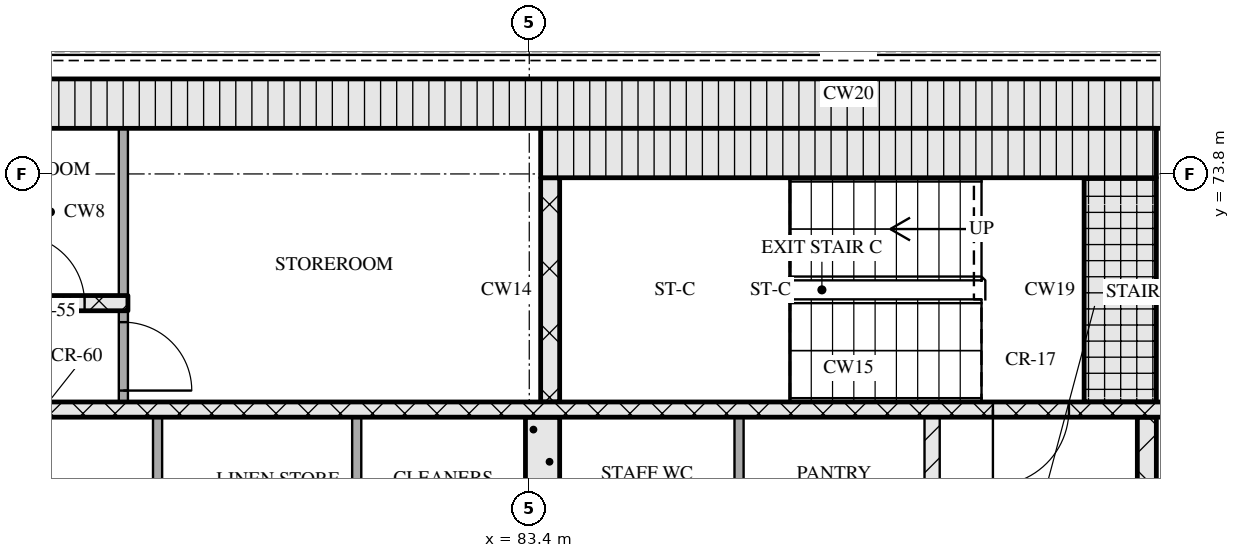
"""IFC4 building model, lengths in metres.
Left out: names, types, materials, properties, quantities, classifications, styles, units other than length and angle.
Written with IfcOpenShell. Run it as: python <this file> out.ifc"""

import sys

from ifc_helpers import new_model, si_unit, direction, frame, frame_2d, origin, place, context, subcontext, project, spatial, rectangle, extrude, element, fill, save


model = new_model("IFC4")
c1 = context("Model", 3, precision=1e-05, world=origin(), true_north=direction((0.0, 1.0)))
c2 = subcontext(c1, "Body", "Model", "MODEL_VIEW")
j1 = project(units=[si_unit("LENGTHUNIT", "METRE"), si_unit("PLANEANGLEUNIT", "RADIAN")], contexts=[c1])
p1 = place(None, origin())
s1 = spatial("IfcSite", under=j1, at=p1, CompositionType="ELEMENT")
p2 = place(p1, origin())
s2 = spatial("IfcBuilding", under=s1, at=p2, CompositionType="ELEMENT")
p3 = place(p2, frame((0.0, 0.0, 237.9)))
s3 = spatial("IfcBuildingStorey", under=s2, at=p3, CompositionType="ELEMENT", Elevation=237.9)
p4 = place(p3, frame((67.15, 74.725, 0.0), z_axis=(0.0, 0.0, 1.0), x_axis=(1.0, 0.0, 0.0)))
e1 = element("IfcWall", 1, at=p4, inside=s3, PredefinedType="SOLIDWALL", context=c2, shape_type="SweptSolid", body=[
    extrude(rectangle(XDim=40.9, YDim=0.65, at=frame_2d((20.45, 0.0))), origin(), (0.0, 0.0, 1.0), 3.32),
])
for number, where, z_axis, x_axis in (
    (2, (78.51, 68.0, 0.0), (0.0, 0.0, 1.0), (0.0, 1.0, 0.0)),
    (3, (81.13, 68.0, 0.0), (0.0, 0.0, 1.0), (0.0, 1.0, 0.0)),
):
    element("IfcWall", number, at=place(p3, frame(where, z_axis=z_axis, x_axis=x_axis)), inside=s3, PredefinedType="PARTITIONING", context=c2, shape_type="SweptSolid", body=[
        extrude(rectangle(XDim=2.6, YDim=0.12, at=frame_2d((1.3, 0.0))), origin(), (0.0, 0.0, 1.0), 3.32),
    ])
p5 = place(p3, frame((83.575, 68.0, 0.0), z_axis=(0.0, 0.0, 1.0), x_axis=(0.0, 1.0, 0.0)))
e4 = element("IfcWall", 4, at=p5, inside=s3, PredefinedType="SOLIDWALL", context=c2, shape_type="SweptSolid", body=[
    extrude(rectangle(XDim=2.6, YDim=0.45, at=frame_2d((1.3, 0.0))), origin(), (0.0, 0.0, 1.0), 3.32),
])
p6 = place(p3, frame((86.16, 68.0, 0.0), z_axis=(0.0, 0.0, 1.0), x_axis=(0.0, 1.0, 0.0)))
e5 = element("IfcWall", 5, at=p6, inside=s3, PredefinedType="PARTITIONING", context=c2, shape_type="SweptSolid", body=[
    extrude(rectangle(XDim=2.6, YDim=0.12, at=frame_2d((1.3, 0.0))), origin(), (0.0, 0.0, 1.0), 3.32),
])
p7 = place(p3, frame((88.7, 68.0, 0.0), z_axis=(0.0, 0.0, 1.0), x_axis=(0.0, 1.0, 0.0)))
e6 = element("IfcWall", 6, at=p7, inside=s3, PredefinedType="PARTITIONING", context=c2, shape_type="SweptSolid", body=[
    extrude(rectangle(XDim=2.6, YDim=0.2, at=frame_2d((1.3, 0.0))), origin(), (0.0, 0.0, 1.0), 3.32),
])
p8 = place(p3, frame((91.525, 68.0, 0.0), z_axis=(0.0, 0.0, 1.0), x_axis=(0.0, 1.0, 0.0)))
e7 = element("IfcWall", 7, at=p8, inside=s3, PredefinedType="SOLIDWALL", context=c2, shape_type="SweptSolid", body=[
    extrude(rectangle(XDim=2.6, YDim=0.25, at=frame_2d((1.3, 0.0))), origin(), (0.0, 0.0, 1.0), 3.32),
])
p9 = place(p3, frame((67.8, 70.7, 0.0), z_axis=(0.0, 0.0, 1.0), x_axis=(1.0, 0.0, 0.0)))
e8 = element("IfcWall", 8, at=p9, inside=s3, PredefinedType="SOLIDWALL", context=c2, shape_type="SweptSolid", body=[
    extrude(rectangle(XDim=39.6, YDim=0.2, at=frame_2d((19.8, 0.0))), origin(), (0.0, 0.0, 1.0), 3.32),
])
p10 = place(p9, frame((0.65, 0.0, 0.0)))
e9 = element("IfcOpeningElement", 9, at=p10, cuts=e8, PredefinedType="OPENING", context=c2, shape_type="SweptSolid", body=[
    extrude(rectangle(XDim=1.1, YDim=2.1, at=frame_2d((0.55, 1.05))), frame((0.0, 0.11, 0.0), z_axis=(0.0, -1.0, 0.0), x_axis=(1.0, 0.0, 0.0)), (0.0, 0.0, 1.0), 0.22),
])
p11 = place(p9, frame((3.25, 0.0, 0.0)))
e10 = element("IfcOpeningElement", 10, at=p11, cuts=e8, PredefinedType="OPENING", context=c2, shape_type="SweptSolid", body=[
    extrude(rectangle(XDim=1.1, YDim=2.1, at=frame_2d((0.55, 1.05))), frame((0.0, 0.11, 0.0), z_axis=(0.0, -1.0, 0.0), x_axis=(1.0, 0.0, 0.0)), (0.0, 0.0, 1.0), 0.22),
])
p12 = place(p9, frame((5.9, 0.0, 0.0)))
e11 = element("IfcOpeningElement", 11, at=p12, cuts=e8, PredefinedType="OPENING", context=c2, shape_type="SweptSolid", body=[
    extrude(rectangle(XDim=1.0, YDim=2.1, at=frame_2d((0.5, 1.05))), frame((0.0, 0.11, 0.0), z_axis=(0.0, -1.0, 0.0), x_axis=(1.0, 0.0, 0.0)), (0.0, 0.0, 1.0), 0.22),
])
p13 = place(p9, frame((21.7, 0.0, 0.0)))
e12 = element("IfcOpeningElement", 12, at=p13, cuts=e8, PredefinedType="OPENING", context=c2, shape_type="SweptSolid", body=[
    extrude(rectangle(XDim=1.0, YDim=2.1, at=frame_2d((0.5, 1.05))), frame((0.0, 0.11, 0.0), z_axis=(0.0, -1.0, 0.0), x_axis=(1.0, 0.0, 0.0)), (0.0, 0.0, 1.0), 0.22),
])
p14 = place(p9, frame((32.7, 0.0, 0.0)))
e13 = element("IfcOpeningElement", 13, at=p14, cuts=e8, PredefinedType="OPENING", context=c2, shape_type="SweptSolid", body=[
    extrude(rectangle(XDim=1.0, YDim=2.1, at=frame_2d((0.5, 1.05))), frame((0.0, 0.11, 0.0), z_axis=(0.0, -1.0, 0.0), x_axis=(1.0, 0.0, 0.0)), (0.0, 0.0, 1.0), 0.22),
])
p15 = place(p9, frame((35.25, 0.0, 0.0)))
e14 = element("IfcOpeningElement", 14, at=p15, cuts=e8, PredefinedType="OPENING", context=c2, shape_type="SweptSolid", body=[
    extrude(rectangle(XDim=1.1, YDim=2.1, at=frame_2d((0.55, 1.05))), frame((0.0, 0.11, 0.0), z_axis=(0.0, -1.0, 0.0), x_axis=(1.0, 0.0, 0.0)), (0.0, 0.0, 1.0), 0.22),
])
p16 = place(p9, frame((37.85, 0.0, 0.0)))
e15 = element("IfcOpeningElement", 15, at=p16, cuts=e8, PredefinedType="OPENING", context=c2, shape_type="SweptSolid", body=[
    extrude(rectangle(XDim=1.1, YDim=2.1, at=frame_2d((0.55, 1.05))), frame((0.0, 0.11, 0.0), z_axis=(0.0, -1.0, 0.0), x_axis=(1.0, 0.0, 0.0)), (0.0, 0.0, 1.0), 0.22),
])
p17 = place(p3, frame((78.06, 70.8, 0.0), z_axis=(0.0, 0.0, 1.0), x_axis=(0.0, 1.0, 0.0)))
e16 = element("IfcWall", 16, at=p17, inside=s3, PredefinedType="PARTITIONING", context=c2, shape_type="SweptSolid", body=[
    extrude(rectangle(XDim=1.2, YDim=0.12, at=frame_2d((0.6, 0.0))), origin(), (0.0, 0.0, 1.0), 3.32),
])
p18 = place(p17, frame((0.15, 0.0, 0.0)))
e17 = element("IfcOpeningElement", 17, at=p18, cuts=e16, PredefinedType="OPENING", context=c2, shape_type="SweptSolid", body=[
    extrude(rectangle(XDim=0.9, YDim=2.1, at=frame_2d((0.45, 1.05))), frame((0.0, 0.07, 0.0), z_axis=(0.0, -1.0, 0.0), x_axis=(1.0, 0.0, 0.0)), (0.0, 0.0, 1.0), 0.14),
])
p19 = place(p3, frame((83.675, 70.8, 0.0), z_axis=(0.0, 0.0, 1.0), x_axis=(0.0, 1.0, 0.0)))
e18 = element("IfcWall", 18, at=p19, inside=s3, PredefinedType="SOLIDWALL", context=c2, shape_type="SweptSolid", body=[
    extrude(rectangle(XDim=2.95, YDim=0.25, at=frame_2d((1.475, 0.0))), origin(), (0.0, 0.0, 1.0), 3.32),
])
p20 = place(p3, frame((91.175, 70.8, 0.0), z_axis=(0.0, 0.0, 1.0), x_axis=(0.0, 1.0, 0.0)))
e19 = element("IfcWall", 19, at=p20, inside=s3, PredefinedType="SOLIDWALL", context=c2, shape_type="SweptSolid", body=[
    extrude(rectangle(XDim=2.95, YDim=0.95, at=frame_2d((1.475, 0.0))), origin(), (0.0, 0.0, 1.0), 3.32),
])
p21 = place(p3, frame((72.8, 72.1, 0.0), z_axis=(0.0, 0.0, 1.0), x_axis=(1.0, 0.0, 0.0)))
e20 = element("IfcWall", 20, at=p21, inside=s3, PredefinedType="SOLIDWALL", context=c2, shape_type="SweptSolid", body=[
    extrude(rectangle(XDim=5.32, YDim=0.2, at=frame_2d((2.66, 0.0))), origin(), (0.0, 0.0, 1.0), 3.32),
])
p22 = place(p21, frame((1.25, 0.0, 0.0)))
e21 = element("IfcOpeningElement", 21, at=p22, cuts=e20, PredefinedType="OPENING", context=c2, shape_type="SweptSolid", body=[
    extrude(rectangle(XDim=0.9, YDim=2.1, at=frame_2d((0.45, 1.05))), frame((0.0, 0.11, 0.0), z_axis=(0.0, -1.0, 0.0), x_axis=(1.0, 0.0, 0.0)), (0.0, 0.0, 1.0), 0.22),
])
p23 = place(p21, frame((3.85, 0.0, 0.0)))
e22 = element("IfcOpeningElement", 22, at=p23, cuts=e20, PredefinedType="OPENING", context=c2, shape_type="SweptSolid", body=[
    extrude(rectangle(XDim=0.9, YDim=2.1, at=frame_2d((0.45, 1.05))), frame((0.0, 0.11, 0.0), z_axis=(0.0, -1.0, 0.0), x_axis=(1.0, 0.0, 0.0)), (0.0, 0.0, 1.0), 0.22),
])
p24 = place(p3, frame((78.06, 72.2, 0.0), z_axis=(0.0, 0.0, 1.0), x_axis=(0.0, 1.0, 0.0)))
e23 = element("IfcWall", 23, at=p24, inside=s3, PredefinedType="PARTITIONING", context=c2, shape_type="SweptSolid", body=[
    extrude(rectangle(XDim=2.2, YDim=0.12, at=frame_2d((1.1, 0.0))), origin(), (0.0, 0.0, 1.0), 3.32),
])
p25 = place(p3, frame((83.55, 74.075, 0.0), z_axis=(0.0, 0.0, 1.0), x_axis=(1.0, 0.0, 0.0)))
e24 = element("IfcWall", 24, at=p25, inside=s3, PredefinedType="SOLIDWALL", context=c2, shape_type="SweptSolid", body=[
    extrude(rectangle(XDim=8.1, YDim=0.65, at=frame_2d((4.05, 0.0))), origin(), (0.0, 0.0, 1.0), 3.32),
])
p26 = place(p13, origin())
e25 = element("IfcDoor", 25, at=p26, inside=s3, OperationType="SINGLE_SWING_RIGHT", PredefinedType="DOOR", context=c2, shape_type="SweptSolid", body=[
    extrude(rectangle(XDim=1.0, YDim=2.1, at=frame_2d((0.5, 1.05))), frame((0.0, 0.025, 0.0), z_axis=(0.0, -1.0, 0.0), x_axis=(1.0, 0.0, 0.0)), (0.0, 0.0, 1.0), 0.05),
])
fill(e12, e25)
p27 = place(p18, origin())
e26 = element("IfcDoor", 26, at=p27, inside=s3, OperationType="SINGLE_SWING_RIGHT", PredefinedType="DOOR", context=c2, shape_type="SweptSolid", body=[
    extrude(rectangle(XDim=0.9, YDim=2.1, at=frame_2d((0.45, 1.05))), frame((0.0, 0.025, 0.0), z_axis=(0.0, -1.0, 0.0), x_axis=(1.0, 0.0, 0.0)), (0.0, 0.0, 1.0), 0.05),
])
fill(e17, e26)
p28 = place(p23, origin())
e27 = element("IfcDoor", 27, at=p28, inside=s3, OperationType="SINGLE_SWING_LEFT", PredefinedType="DOOR", context=c2, shape_type="SweptSolid", body=[
    extrude(rectangle(XDim=0.9, YDim=2.1, at=frame_2d((0.45, 1.05))), frame((0.0, 0.025, 0.0), z_axis=(0.0, -1.0, 0.0), x_axis=(1.0, 0.0, 0.0)), (0.0, 0.0, 1.0), 0.05),
])
fill(e22, e27)
save(model, sys.argv[1])
